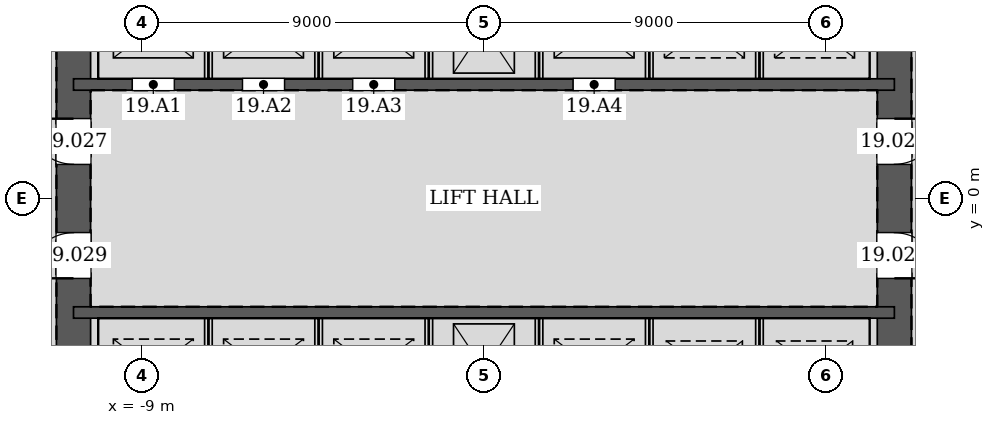
"""IFC4 building model, lengths in metres.
Left out: names, types, materials, properties, quantities, classifications, styles, units other than length and angle.
Written with IfcOpenShell. Run it as: python <this file> out.ifc"""

import sys

from ifc_helpers import new_model, si_unit, direction, frame, frame_2d, origin, place, context, subcontext, project, spatial, rectangle, extrude, element, fill, save


model = new_model("IFC4")
c1 = context("Model", 3, precision=1e-05, world=origin(), true_north=direction((0.0, 1.0)))
c2 = subcontext(c1, "Body", "Model", "MODEL_VIEW")
j1 = project(units=[si_unit("LENGTHUNIT", "METRE"), si_unit("PLANEANGLEUNIT", "RADIAN")], contexts=[c1])
p1 = place(None, origin())
s1 = spatial("IfcSite", under=j1, at=p1, CompositionType="ELEMENT")
p2 = place(p1, origin())
s2 = spatial("IfcBuilding", under=s1, at=p2, CompositionType="ELEMENT")
p3 = place(p2, frame((0.0, 0.0, 87.6)))
s3 = spatial("IfcBuildingStorey", under=s2, at=p3, CompositionType="ELEMENT", Elevation=87.6)
p4 = place(p3, frame((10.8, -10.8, 0.0), z_axis=(0.0, 0.0, 1.0), x_axis=(0.0, 1.0, 0.0)))
e1 = element("IfcWall", 1, at=p4, inside=s3, PredefinedType="SOLIDWALL", context=c2, shape_type="SweptSolid", body=[
    extrude(rectangle(XDim=21.6, YDim=0.9, at=frame_2d((10.8, 0.0))), origin(), (0.0, 0.0, 1.0), 4.2),
])
p5 = place(p4, frame((11.7, 0.0, 0.0)))
e2 = element("IfcOpeningElement", 2, at=p5, cuts=e1, PredefinedType="OPENING", context=c2, shape_type="SweptSolid", body=[
    extrude(rectangle(XDim=1.2, YDim=2.1, at=frame_2d((0.6, 1.05))), frame((0.0, 0.46, 0.0), z_axis=(0.0, -1.0, 0.0), x_axis=(1.0, 0.0, 0.0)), (0.0, 0.0, 1.0), 0.92),
])
p6 = place(p4, frame((8.7, 0.0, 0.0)))
e3 = element("IfcOpeningElement", 3, at=p6, cuts=e1, PredefinedType="OPENING", context=c2, shape_type="SweptSolid", body=[
    extrude(rectangle(XDim=1.2, YDim=2.1, at=frame_2d((0.6, 1.05))), frame((0.0, 0.46, 0.0), z_axis=(0.0, -1.0, 0.0), x_axis=(1.0, 0.0, 0.0)), (0.0, 0.0, 1.0), 0.92),
])
p7 = place(p3, frame((-10.8, 10.8, 0.0), z_axis=(0.0, 0.0, 1.0), x_axis=(0.0, -1.0, 0.0)))
e4 = element("IfcWall", 4, at=p7, inside=s3, PredefinedType="SOLIDWALL", context=c2, shape_type="SweptSolid", body=[
    extrude(rectangle(XDim=21.6, YDim=0.9, at=frame_2d((10.8, 0.0))), origin(), (0.0, 0.0, 1.0), 4.2),
])
p8 = place(p7, frame((8.7, 0.0, 0.0)))
e5 = element("IfcOpeningElement", 5, at=p8, cuts=e4, PredefinedType="OPENING", context=c2, shape_type="SweptSolid", body=[
    extrude(rectangle(XDim=1.2, YDim=2.1, at=frame_2d((0.6, 1.05))), frame((0.0, 0.46, 0.0), z_axis=(0.0, -1.0, 0.0), x_axis=(1.0, 0.0, 0.0)), (0.0, 0.0, 1.0), 0.92),
])
p9 = place(p7, frame((11.7, 0.0, 0.0)))
e6 = element("IfcOpeningElement", 6, at=p9, cuts=e4, PredefinedType="OPENING", context=c2, shape_type="SweptSolid", body=[
    extrude(rectangle(XDim=1.2, YDim=2.1, at=frame_2d((0.6, 1.05))), frame((0.0, 0.46, 0.0), z_axis=(0.0, -1.0, 0.0), x_axis=(1.0, 0.0, 0.0)), (0.0, 0.0, 1.0), 0.92),
])
p10 = place(p3, frame((-10.8, 3.0, 0.0), z_axis=(0.0, 0.0, 1.0), x_axis=(1.0, 0.0, 0.0)))
e7 = element("IfcWall", 7, at=p10, inside=s3, PredefinedType="SOLIDWALL", context=c2, shape_type="SweptSolid", body=[
    extrude(rectangle(XDim=21.6, YDim=0.3, at=frame_2d((10.8, 0.0))), origin(), (0.0, 0.0, 1.0), 4.2),
])
p11 = place(p10, frame((1.55, 0.0, 0.0)))
e8 = element("IfcOpeningElement", 8, at=p11, cuts=e7, PredefinedType="OPENING", context=c2, shape_type="SweptSolid", body=[
    extrude(rectangle(XDim=1.1, YDim=2.1, at=frame_2d((0.55, 1.05))), frame((0.0, 0.16, 0.0), z_axis=(0.0, -1.0, 0.0), x_axis=(1.0, 0.0, 0.0)), (0.0, 0.0, 1.0), 0.32),
])
p12 = place(p10, frame((4.45, 0.0, 0.0)))
e9 = element("IfcOpeningElement", 9, at=p12, cuts=e7, PredefinedType="OPENING", context=c2, shape_type="SweptSolid", body=[
    extrude(rectangle(XDim=1.1, YDim=2.1, at=frame_2d((0.55, 1.05))), frame((0.0, 0.16, 0.0), z_axis=(0.0, -1.0, 0.0), x_axis=(1.0, 0.0, 0.0)), (0.0, 0.0, 1.0), 0.32),
])
p13 = place(p10, frame((7.35, 0.0, 0.0)))
e10 = element("IfcOpeningElement", 10, at=p13, cuts=e7, PredefinedType="OPENING", context=c2, shape_type="SweptSolid", body=[
    extrude(rectangle(XDim=1.1, YDim=2.1, at=frame_2d((0.55, 1.05))), frame((0.0, 0.16, 0.0), z_axis=(0.0, -1.0, 0.0), x_axis=(1.0, 0.0, 0.0)), (0.0, 0.0, 1.0), 0.32),
])
p14 = place(p10, frame((13.15, 0.0, 0.0)))
e11 = element("IfcOpeningElement", 11, at=p14, cuts=e7, PredefinedType="OPENING", context=c2, shape_type="SweptSolid", body=[
    extrude(rectangle(XDim=1.1, YDim=2.1, at=frame_2d((0.55, 1.05))), frame((0.0, 0.16, 0.0), z_axis=(0.0, -1.0, 0.0), x_axis=(1.0, 0.0, 0.0)), (0.0, 0.0, 1.0), 0.32),
])
p15 = place(p3, frame((-10.8, -3.0, 0.0), z_axis=(0.0, 0.0, 1.0), x_axis=(1.0, 0.0, 0.0)))
e12 = element("IfcWall", 12, at=p15, inside=s3, PredefinedType="SOLIDWALL", context=c2, shape_type="SweptSolid", body=[
    extrude(rectangle(XDim=21.6, YDim=0.3, at=frame_2d((10.8, 0.0))), origin(), (0.0, 0.0, 1.0), 4.2),
])
for number, where, z_axis, x_axis in (
    (13, (-7.25, 3.15, 0.0), (0.0, 0.0, 1.0), (0.0, 1.0, 0.0)),
    (14, (-4.35, 3.15, 0.0), (0.0, 0.0, 1.0), (0.0, 1.0, 0.0)),
    (15, (-1.45, 3.15, 0.0), (0.0, 0.0, 1.0), (0.0, 1.0, 0.0)),
    (16, (1.45, 3.15, 0.0), (0.0, 0.0, 1.0), (0.0, 1.0, 0.0)),
    (17, (4.35, 3.15, 0.0), (0.0, 0.0, 1.0), (0.0, 1.0, 0.0)),
    (18, (7.25, 3.15, 0.0), (0.0, 0.0, 1.0), (0.0, 1.0, 0.0)),
    (19, (-7.25, -5.85, 0.0), (0.0, 0.0, 1.0), (0.0, 1.0, 0.0)),
    (20, (-4.35, -5.85, 0.0), (0.0, 0.0, 1.0), (0.0, 1.0, 0.0)),
    (21, (-1.45, -5.85, 0.0), (0.0, 0.0, 1.0), (0.0, 1.0, 0.0)),
    (22, (1.45, -5.85, 0.0), (0.0, 0.0, 1.0), (0.0, 1.0, 0.0)),
    (23, (4.35, -5.85, 0.0), (0.0, 0.0, 1.0), (0.0, 1.0, 0.0)),
    (24, (7.25, -5.85, 0.0), (0.0, 0.0, 1.0), (0.0, 1.0, 0.0)),
):
    element("IfcWall", number, at=place(p3, frame(where, z_axis=z_axis, x_axis=x_axis)), inside=s3, PredefinedType="PARTITIONING", context=c2, shape_type="SweptSolid", body=[
        extrude(rectangle(XDim=2.7, YDim=0.2, at=frame_2d((1.35, 0.0))), origin(), (0.0, 0.0, 1.0), 4.2),
    ])
p16 = place(p5, frame((1.2, 0.0, 0.0), z_axis=(0.0, 0.0, 1.0), x_axis=(-1.0, 0.0, 0.0)))
e25 = element("IfcDoor", 25, at=p16, inside=s3, OperationType="SINGLE_SWING_LEFT", PredefinedType="DOOR", context=c2, shape_type="SweptSolid", body=[
    extrude(rectangle(XDim=1.2, YDim=2.1, at=frame_2d((0.6, 1.05))), frame((0.0, 0.025, 0.0), z_axis=(0.0, -1.0, 0.0), x_axis=(1.0, 0.0, 0.0)), (0.0, 0.0, 1.0), 0.05),
])
fill(e2, e25)
p17 = place(p8, frame((1.2, 0.0, 0.0), z_axis=(0.0, 0.0, 1.0), x_axis=(-1.0, 0.0, 0.0)))
e26 = element("IfcDoor", 26, at=p17, inside=s3, OperationType="SINGLE_SWING_RIGHT", PredefinedType="DOOR", context=c2, shape_type="SweptSolid", body=[
    extrude(rectangle(XDim=1.2, YDim=2.1, at=frame_2d((0.6, 1.05))), frame((0.0, 0.025, 0.0), z_axis=(0.0, -1.0, 0.0), x_axis=(1.0, 0.0, 0.0)), (0.0, 0.0, 1.0), 0.05),
])
fill(e5, e26)
p18 = place(p6, frame((1.2, 0.0, 0.0), z_axis=(0.0, 0.0, 1.0), x_axis=(-1.0, 0.0, 0.0)))
e27 = element("IfcDoor", 27, at=p18, inside=s3, OperationType="SINGLE_SWING_RIGHT", PredefinedType="DOOR", context=c2, shape_type="SweptSolid", body=[
    extrude(rectangle(XDim=1.2, YDim=2.1, at=frame_2d((0.6, 1.05))), frame((0.0, 0.025, 0.0), z_axis=(0.0, -1.0, 0.0), x_axis=(1.0, 0.0, 0.0)), (0.0, 0.0, 1.0), 0.05),
])
fill(e3, e27)
p19 = place(p9, frame((1.2, 0.0, 0.0), z_axis=(0.0, 0.0, 1.0), x_axis=(-1.0, 0.0, 0.0)))
e28 = element("IfcDoor", 28, at=p19, inside=s3, OperationType="SINGLE_SWING_LEFT", PredefinedType="DOOR", context=c2, shape_type="SweptSolid", body=[
    extrude(rectangle(XDim=1.2, YDim=2.1, at=frame_2d((0.6, 1.05))), frame((0.0, 0.025, 0.0), z_axis=(0.0, -1.0, 0.0), x_axis=(1.0, 0.0, 0.0)), (0.0, 0.0, 1.0), 0.05),
])
fill(e6, e28)
p20 = place(p11, origin())
e29 = element("IfcDoor", 29, at=p20, inside=s3, OperationType="DOUBLE_DOOR_SLIDING", PredefinedType="DOOR", context=c2, shape_type="SweptSolid", body=[
    extrude(rectangle(XDim=1.1, YDim=2.1, at=frame_2d((0.55, 1.05))), frame((0.0, 0.025, 0.0), z_axis=(0.0, -1.0, 0.0), x_axis=(1.0, 0.0, 0.0)), (0.0, 0.0, 1.0), 0.05),
])
fill(e8, e29)
p21 = place(p12, origin())
e30 = element("IfcDoor", 30, at=p21, inside=s3, OperationType="DOUBLE_DOOR_SLIDING", PredefinedType="DOOR", context=c2, shape_type="SweptSolid", body=[
    extrude(rectangle(XDim=1.1, YDim=2.1, at=frame_2d((0.55, 1.05))), frame((0.0, 0.025, 0.0), z_axis=(0.0, -1.0, 0.0), x_axis=(1.0, 0.0, 0.0)), (0.0, 0.0, 1.0), 0.05),
])
fill(e9, e30)
p22 = place(p13, origin())
e31 = element("IfcDoor", 31, at=p22, inside=s3, OperationType="DOUBLE_DOOR_SLIDING", PredefinedType="DOOR", context=c2, shape_type="SweptSolid", body=[
    extrude(rectangle(XDim=1.1, YDim=2.1, at=frame_2d((0.55, 1.05))), frame((0.0, 0.025, 0.0), z_axis=(0.0, -1.0, 0.0), x_axis=(1.0, 0.0, 0.0)), (0.0, 0.0, 1.0), 0.05),
])
fill(e10, e31)
p23 = place(p14, origin())
e32 = element("IfcDoor", 32, at=p23, inside=s3, OperationType="DOUBLE_DOOR_SLIDING", PredefinedType="DOOR", context=c2, shape_type="SweptSolid", body=[
    extrude(rectangle(XDim=1.1, YDim=2.1, at=frame_2d((0.55, 1.05))), frame((0.0, 0.025, 0.0), z_axis=(0.0, -1.0, 0.0), x_axis=(1.0, 0.0, 0.0)), (0.0, 0.0, 1.0), 0.05),
])
fill(e11, e32)
save(model, sys.argv[1])
